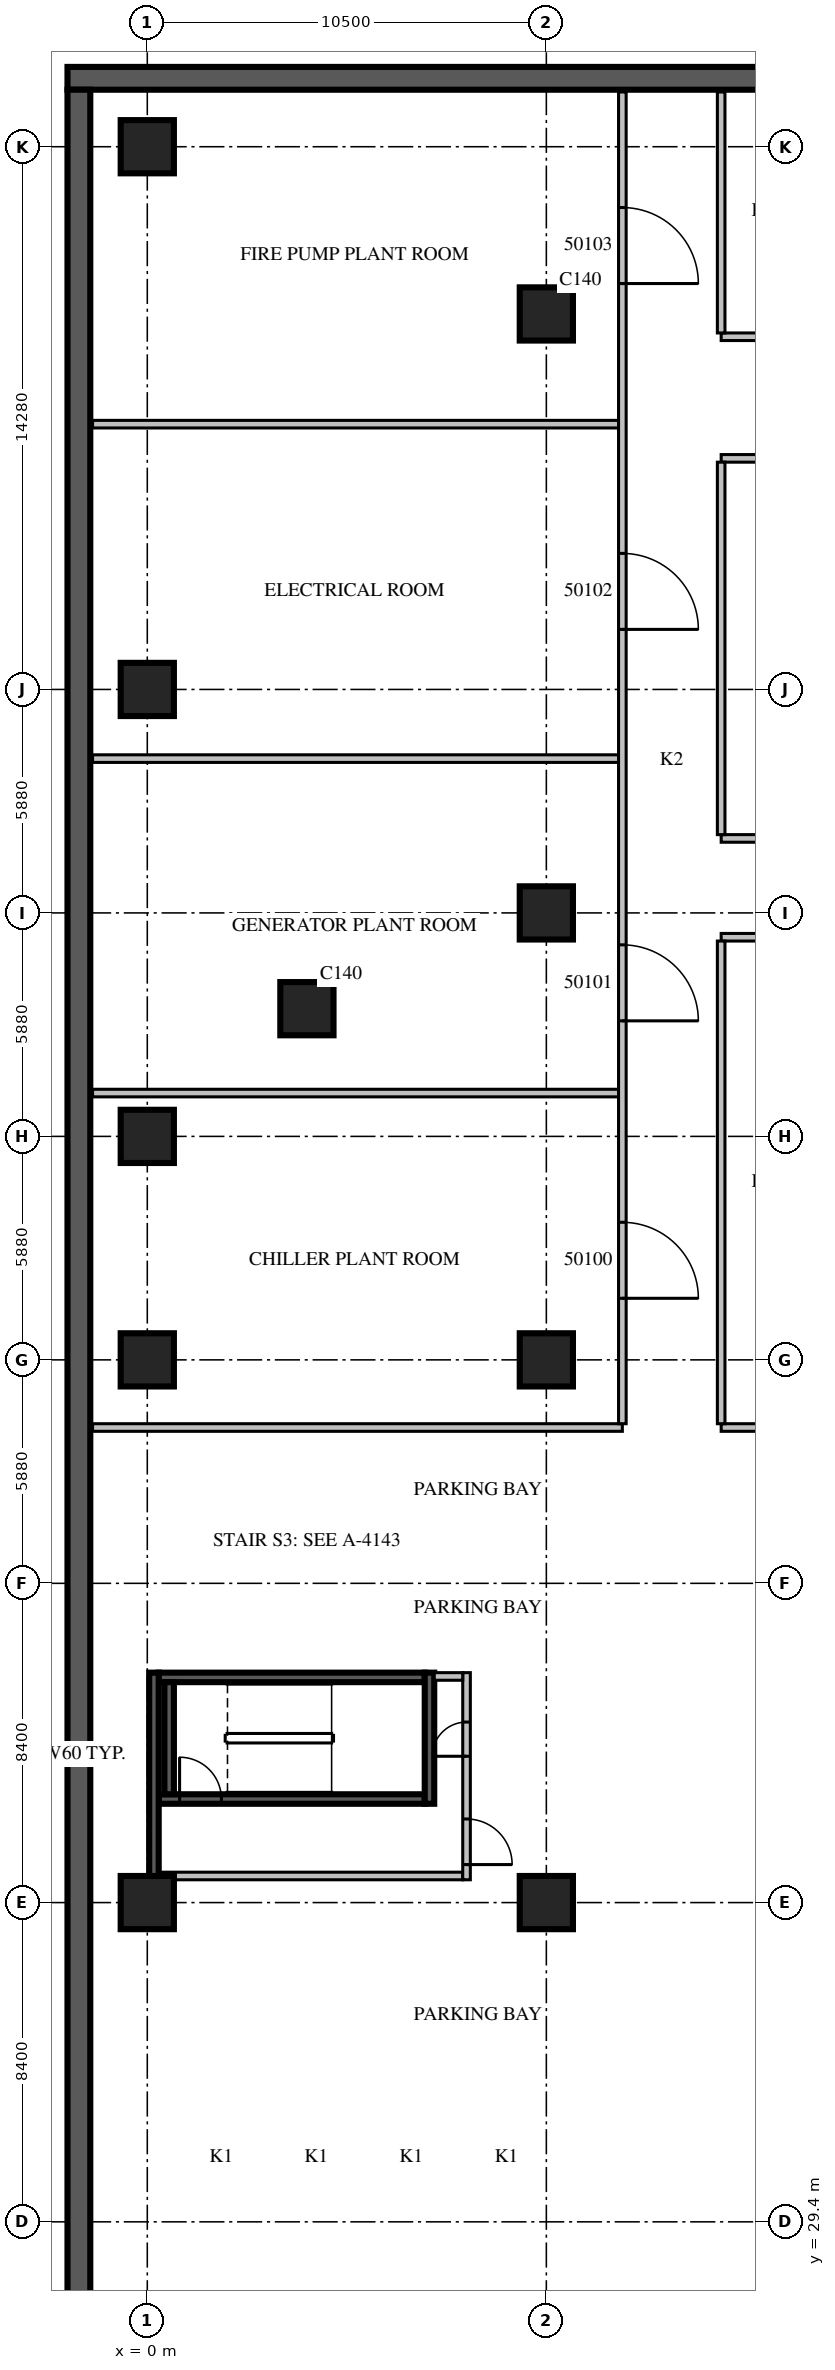
"""IFC4 building model, lengths in metres.
Left out: names, types, materials, properties, quantities, classifications, styles, units other than length and angle.
Written with IfcOpenShell. Run it as: python <this file> out.ifc"""

import sys

from ifc_helpers import new_model, si_unit, direction, frame, frame_2d, origin, origin_2d, place, context, subcontext, project, spatial, rectangle, extrude, source, transform, mapped, element, fill, save


model = new_model("IFC4")
c1 = context("Model", 3, precision=1e-05, world=origin(), true_north=direction((0.0, 1.0)))
c2 = subcontext(c1, "Body", "Model", "MODEL_VIEW")
j1 = project(units=[si_unit("LENGTHUNIT", "METRE"), si_unit("PLANEANGLEUNIT", "RADIAN")], contexts=[c1])
p1 = place(None, origin())
s1 = spatial("IfcSite", under=j1, at=p1, CompositionType="ELEMENT")
p2 = place(p1, origin())
s2 = spatial("IfcBuilding", under=s1, at=p2, CompositionType="ELEMENT")
p3 = place(p2, frame((0.0, 0.0, -9.0)))
s3 = spatial("IfcBuildingStorey", under=s2, at=p3, CompositionType="ELEMENT", Elevation=-9.0)
m1 = source(origin(), c2, "Body", "SweptSolid", [
    extrude(rectangle(XDim=55.68, YDim=0.6, at=frame_2d((27.84, 0.0))), origin(), (0.0, 0.0, 1.0), 4.5),
])
p4 = place(p3, frame((53.58, 85.8, 0.0), z_axis=(0.0, 0.0, 1.0), x_axis=(-1.0, 0.0, 0.0)))
e1 = element("IfcWall", 1, at=p4, inside=s3, PredefinedType="SOLIDWALL", context=c2, shape_type="MappedRepresentation", body=[
    mapped(m1, transform((0.0, 0.0, 0.0), scale=1.0)),
])
m2 = source(origin(), c2, "Body", "SweptSolid", [
    extrude(rectangle(XDim=87.6, YDim=0.6, at=frame_2d((43.8, 0.0))), origin(), (0.0, 0.0, 1.0), 4.5),
])
p5 = place(p3, frame((-1.8, 85.5, 0.0), z_axis=(0.0, 0.0, 1.0), x_axis=(0.0, -1.0, 0.0)))
e2 = element("IfcWall", 2, at=p5, inside=s3, PredefinedType="SOLIDWALL", context=c2, shape_type="MappedRepresentation", body=[
    mapped(m2, transform((0.0, 0.0, 0.0), scale=1.0)),
])
m3 = source(origin(), c2, "Body", "SweptSolid", [
    extrude(rectangle(XDim=1.4, YDim=1.4, at=origin_2d()), origin(), (0.0, 0.0, 1.0), 4.5),
])
for number, where, z_axis, x_axis in (
    (3, (0.0, 37.8, 0.0), (0.0, 0.0, 1.0), (1.0, 0.0, 0.0)),
    (4, (0.0, 52.08, 0.0), (0.0, 0.0, 1.0), (1.0, 0.0, 0.0)),
    (5, (0.0, 57.96, 0.0), (0.0, 0.0, 1.0), (1.0, 0.0, 0.0)),
    (6, (0.0, 69.72, 0.0), (0.0, 0.0, 1.0), (1.0, 0.0, 0.0)),
    (7, (0.0, 84.0, 0.0), (0.0, 0.0, 1.0), (1.0, 0.0, 0.0)),
    (8, (4.2, 61.32, 0.0), (0.0, 0.0, 1.0), (1.0, 0.0, 0.0)),
    (9, (10.5, 37.8, 0.0), (0.0, 0.0, 1.0), (1.0, 0.0, 0.0)),
    (10, (10.5, 52.08, 0.0), (0.0, 0.0, 1.0), (1.0, 0.0, 0.0)),
    (11, (10.5, 63.84, 0.0), (0.0, 0.0, 1.0), (1.0, 0.0, 0.0)),
    (12, (10.5, 79.6, 0.0), (0.0, 0.0, 1.0), (1.0, 0.0, 0.0)),
):
    element("IfcColumn", number, at=place(p3, frame(where, z_axis=z_axis, x_axis=x_axis)), inside=s3, PredefinedType="COLUMN", context=c2, shape_type="MappedRepresentation", body=[
        mapped(m3, transform((0.0, 0.0, 0.0), scale=1.0)),
    ])
m4 = source(origin(), c2, "Body", "SweptSolid", [
    extrude(rectangle(XDim=7.0, YDim=0.25, at=frame_2d((3.5, 0.0))), origin(), (0.0, 0.0, 1.0), 3.9),
])
p6 = place(p3, frame((0.3, 40.525, 0.0), z_axis=(0.0, 0.0, 1.0), x_axis=(1.0, 0.0, 0.0)))
e13 = element("IfcWall", 13, at=p6, inside=s3, PredefinedType="SOLIDWALL", context=c2, shape_type="MappedRepresentation", body=[
    mapped(m4, transform((0.0, 0.0, 0.0), scale=1.0)),
])
m5 = source(origin(), c2, "Body", "SweptSolid", [
    extrude(rectangle(XDim=1.1, YDim=2.1, at=frame_2d((0.55, 1.05))), frame((0.0, 0.135, 0.0), z_axis=(0.0, -1.0, 0.0), x_axis=(1.0, 0.0, 0.0)), (0.0, 0.0, 1.0), 0.27),
])
p7 = place(p6, frame((0.55, 0.0, 0.0)))
e14 = element("IfcOpeningElement", 14, at=p7, cuts=e13, PredefinedType="OPENING", context=c2, shape_type="MappedRepresentation", body=[
    mapped(m5, transform((0.0, 0.0, 0.0), scale=1.0)),
])
p8 = place(p3, frame((0.3, 43.725, 0.0), z_axis=(0.0, 0.0, 1.0), x_axis=(1.0, 0.0, 0.0)))
e15 = element("IfcWall", 15, at=p8, inside=s3, PredefinedType="SOLIDWALL", context=c2, shape_type="MappedRepresentation", body=[
    mapped(m4, transform((0.0, 0.0, 0.0), scale=1.0)),
])
m6 = source(origin(), c2, "Body", "SweptSolid", [
    extrude(rectangle(XDim=3.45, YDim=0.25, at=frame_2d((1.725, 0.0))), origin(), (0.0, 0.0, 1.0), 3.9),
])
p9 = place(p3, frame((7.425, 40.4, 0.0), z_axis=(0.0, 0.0, 1.0), x_axis=(0.0, 1.0, 0.0)))
e16 = element("IfcWall", 16, at=p9, inside=s3, PredefinedType="SOLIDWALL", context=c2, shape_type="MappedRepresentation", body=[
    mapped(m6, transform((0.0, 0.0, 0.0), scale=1.0)),
])
m7 = source(origin(), c2, "Body", "SweptSolid", [
    extrude(rectangle(XDim=2.95, YDim=0.25, at=frame_2d((1.475, 0.0))), origin(), (0.0, 0.0, 1.0), 3.9),
])
p10 = place(p3, frame((0.575, 40.65, 0.0), z_axis=(0.0, 0.0, 1.0), x_axis=(0.0, 1.0, 0.0)))
e17 = element("IfcWall", 17, at=p10, inside=s3, PredefinedType="SOLIDWALL", context=c2, shape_type="MappedRepresentation", body=[
    mapped(m7, transform((0.0, 0.0, 0.0), scale=1.0)),
])
m8 = source(origin(), c2, "Body", "SweptSolid", [
    extrude(rectangle(XDim=8.0, YDim=0.2, at=frame_2d((4.0, 0.0))), origin(), (0.0, 0.0, 1.0), 3.9),
])
p11 = place(p3, frame((0.3, 38.5, 0.0), z_axis=(0.0, 0.0, 1.0), x_axis=(1.0, 0.0, 0.0)))
e18 = element("IfcWall", 18, at=p11, inside=s3, PredefinedType="PARTITIONING", context=c2, shape_type="MappedRepresentation", body=[
    mapped(m8, transform((0.0, 0.0, 0.0), scale=1.0)),
])
m9 = source(origin(), c2, "Body", "SweptSolid", [
    extrude(rectangle(XDim=5.45, YDim=0.2, at=frame_2d((2.725, 0.0))), origin(), (0.0, 0.0, 1.0), 3.9),
])
p12 = place(p3, frame((8.4, 38.4, 0.0), z_axis=(0.0, 0.0, 1.0), x_axis=(0.0, 1.0, 0.0)))
e19 = element("IfcWall", 19, at=p12, inside=s3, PredefinedType="PARTITIONING", context=c2, shape_type="MappedRepresentation", body=[
    mapped(m9, transform((0.0, 0.0, 0.0), scale=1.0)),
])
m10 = source(origin(), c2, "Body", "SweptSolid", [
    extrude(rectangle(XDim=1.2, YDim=2.1, at=frame_2d((0.6, 1.05))), frame((0.0, 0.11, 0.0), z_axis=(0.0, -1.0, 0.0), x_axis=(1.0, 0.0, 0.0)), (0.0, 0.0, 1.0), 0.22),
])
p13 = place(p12, frame((0.4, 0.0, 0.0)))
e20 = element("IfcOpeningElement", 20, at=p13, cuts=e19, PredefinedType="OPENING", context=c2, shape_type="MappedRepresentation", body=[
    mapped(m10, transform((0.0, 0.0, 0.0), scale=1.0)),
])
m11 = source(origin(), c2, "Body", "SweptSolid", [
    extrude(rectangle(XDim=0.9, YDim=2.1, at=frame_2d((0.45, 1.05))), frame((0.0, 0.11, 0.0), z_axis=(0.0, -1.0, 0.0), x_axis=(1.0, 0.0, 0.0)), (0.0, 0.0, 1.0), 0.22),
])
p14 = place(p12, frame((3.25, 0.0, 0.0)))
e21 = element("IfcOpeningElement", 21, at=p14, cuts=e19, PredefinedType="OPENING", context=c2, shape_type="MappedRepresentation", body=[
    mapped(m11, transform((0.0, 0.0, 0.0), scale=1.0)),
])
m12 = source(origin(), c2, "Body", "SweptSolid", [
    extrude(rectangle(XDim=0.75, YDim=0.2, at=frame_2d((0.375, 0.0))), origin(), (0.0, 0.0, 1.0), 3.9),
])
p15 = place(p3, frame((7.55, 43.75, 0.0), z_axis=(0.0, 0.0, 1.0), x_axis=(1.0, 0.0, 0.0)))
e22 = element("IfcWall", 22, at=p15, inside=s3, PredefinedType="PARTITIONING", context=c2, shape_type="MappedRepresentation", body=[
    mapped(m12, transform((0.0, 0.0, 0.0), scale=1.0)),
])
m13 = source(origin(), c2, "Body", "SweptSolid", [
    extrude(rectangle(XDim=5.45, YDim=0.25, at=frame_2d((2.725, 0.0))), origin(), (0.0, 0.0, 1.0), 3.9),
])
p16 = place(p3, frame((0.175, 38.4, 0.0), z_axis=(0.0, 0.0, 1.0), x_axis=(0.0, 1.0, 0.0)))
e23 = element("IfcWall", 23, at=p16, inside=s3, PredefinedType="SOLIDWALL", context=c2, shape_type="MappedRepresentation", body=[
    mapped(m13, transform((0.0, 0.0, 0.0), scale=1.0)),
])
m14 = source(origin(), c2, "Body", "SweptSolid", [
    extrude(rectangle(XDim=13.94, YDim=0.2, at=frame_2d((6.97, 0.0))), origin(), (0.0, 0.0, 1.0), 3.9),
])
p17 = place(p3, frame((-1.44, 50.3, 0.0), z_axis=(0.0, 0.0, 1.0), x_axis=(1.0, 0.0, 0.0)))
e24 = element("IfcWall", 24, at=p17, inside=s3, PredefinedType="PARTITIONING", context=c2, shape_type="MappedRepresentation", body=[
    mapped(m14, transform((0.0, 0.0, 0.0), scale=1.0)),
])
m15 = source(origin(), c2, "Body", "SweptSolid", [
    extrude(rectangle(XDim=38.48, YDim=0.2, at=frame_2d((19.24, 0.0))), origin(), (0.0, 0.0, 1.0), 3.9),
])
p18 = place(p3, frame((15.1, 50.3, 0.0), z_axis=(0.0, 0.0, 1.0), x_axis=(1.0, 0.0, 0.0)))
e25 = element("IfcWall", 25, at=p18, inside=s3, PredefinedType="PARTITIONING", context=c2, shape_type="MappedRepresentation", body=[
    mapped(m15, transform((0.0, 0.0, 0.0), scale=1.0)),
])
p19 = place(p3, frame((-1.44, 59.1, 0.0), z_axis=(0.0, 0.0, 1.0), x_axis=(1.0, 0.0, 0.0)))
e26 = element("IfcWall", 26, at=p19, inside=s3, PredefinedType="PARTITIONING", context=c2, shape_type="MappedRepresentation", body=[
    mapped(m14, transform((0.0, 0.0, 0.0), scale=1.0)),
])
m16 = source(origin(), c2, "Body", "SweptSolid", [
    extrude(rectangle(XDim=38.42, YDim=0.2, at=frame_2d((19.21, 0.0))), origin(), (0.0, 0.0, 1.0), 3.9),
])
p20 = place(p3, frame((15.1, 63.2, 0.0), z_axis=(0.0, 0.0, 1.0), x_axis=(1.0, 0.0, 0.0)))
e27 = element("IfcWall", 27, at=p20, inside=s3, PredefinedType="PARTITIONING", context=c2, shape_type="MappedRepresentation", body=[
    mapped(m16, transform((0.0, 0.0, 0.0), scale=1.0)),
])
p21 = place(p20, frame((3.2, 0.0, 0.0)))
e28 = element("IfcOpeningElement", 28, at=p21, cuts=e27, PredefinedType="OPENING", context=c2, shape_type="MappedRepresentation", body=[
    mapped(m10, transform((0.0, 0.0, 0.0), scale=1.0)),
])
m17 = source(origin(), c2, "Body", "SweptSolid", [
    extrude(rectangle(XDim=2.0, YDim=2.1, at=frame_2d((1.0, 1.05))), frame((0.0, 0.11, 0.0), z_axis=(0.0, -1.0, 0.0), x_axis=(1.0, 0.0, 0.0)), (0.0, 0.0, 1.0), 0.22),
])
p22 = place(p20, frame((10.5, 0.0, 0.0)))
e29 = element("IfcOpeningElement", 29, at=p22, cuts=e27, PredefinedType="OPENING", context=c2, shape_type="MappedRepresentation", body=[
    mapped(m17, transform((0.0, 0.0, 0.0), scale=1.0)),
])
p23 = place(p20, frame((18.6, 0.0, 0.0)))
e30 = element("IfcOpeningElement", 30, at=p23, cuts=e27, PredefinedType="OPENING", context=c2, shape_type="MappedRepresentation", body=[
    mapped(m17, transform((0.0, 0.0, 0.0), scale=1.0)),
])
p24 = place(p20, frame((26.7, 0.0, 0.0)))
e31 = element("IfcOpeningElement", 31, at=p24, cuts=e27, PredefinedType="OPENING", context=c2, shape_type="MappedRepresentation", body=[
    mapped(m17, transform((0.0, 0.0, 0.0), scale=1.0)),
])
p25 = place(p20, frame((34.4, 0.0, 0.0)))
e32 = element("IfcOpeningElement", 32, at=p25, cuts=e27, PredefinedType="OPENING", context=c2, shape_type="MappedRepresentation", body=[
    mapped(m10, transform((0.0, 0.0, 0.0), scale=1.0)),
])
p26 = place(p3, frame((15.1, 65.8, 0.0), z_axis=(0.0, 0.0, 1.0), x_axis=(1.0, 0.0, 0.0)))
e33 = element("IfcWall", 33, at=p26, inside=s3, PredefinedType="PARTITIONING", context=c2, shape_type="MappedRepresentation", body=[
    mapped(m16, transform((0.0, 0.0, 0.0), scale=1.0)),
])
p27 = place(p26, frame((3.2, 0.0, 0.0)))
e34 = element("IfcOpeningElement", 34, at=p27, cuts=e33, PredefinedType="OPENING", context=c2, shape_type="MappedRepresentation", body=[
    mapped(m10, transform((0.0, 0.0, 0.0), scale=1.0)),
])
p28 = place(p26, frame((10.9, 0.0, 0.0)))
e35 = element("IfcOpeningElement", 35, at=p28, cuts=e33, PredefinedType="OPENING", context=c2, shape_type="MappedRepresentation", body=[
    mapped(m10, transform((0.0, 0.0, 0.0), scale=1.0)),
])
p29 = place(p26, frame((19.0, 0.0, 0.0)))
e36 = element("IfcOpeningElement", 36, at=p29, cuts=e33, PredefinedType="OPENING", context=c2, shape_type="MappedRepresentation", body=[
    mapped(m10, transform((0.0, 0.0, 0.0), scale=1.0)),
])
p30 = place(p26, frame((26.7, 0.0, 0.0)))
e37 = element("IfcOpeningElement", 37, at=p30, cuts=e33, PredefinedType="OPENING", context=c2, shape_type="MappedRepresentation", body=[
    mapped(m10, transform((0.0, 0.0, 0.0), scale=1.0)),
])
p31 = place(p26, frame((34.0, 0.0, 0.0)))
e38 = element("IfcOpeningElement", 38, at=p31, cuts=e33, PredefinedType="OPENING", context=c2, shape_type="MappedRepresentation", body=[
    mapped(m10, transform((0.0, 0.0, 0.0), scale=1.0)),
])
p32 = place(p3, frame((-1.44, 67.9, 0.0), z_axis=(0.0, 0.0, 1.0), x_axis=(1.0, 0.0, 0.0)))
e39 = element("IfcWall", 39, at=p32, inside=s3, PredefinedType="PARTITIONING", context=c2, shape_type="MappedRepresentation", body=[
    mapped(m14, transform((0.0, 0.0, 0.0), scale=1.0)),
])
p33 = place(p3, frame((15.1, 75.8, 0.0), z_axis=(0.0, 0.0, 1.0), x_axis=(1.0, 0.0, 0.0)))
e40 = element("IfcWall", 40, at=p33, inside=s3, PredefinedType="PARTITIONING", context=c2, shape_type="MappedRepresentation", body=[
    mapped(m16, transform((0.0, 0.0, 0.0), scale=1.0)),
])
p34 = place(p3, frame((-1.44, 76.7, 0.0), z_axis=(0.0, 0.0, 1.0), x_axis=(1.0, 0.0, 0.0)))
e41 = element("IfcWall", 41, at=p34, inside=s3, PredefinedType="PARTITIONING", context=c2, shape_type="MappedRepresentation", body=[
    mapped(m14, transform((0.0, 0.0, 0.0), scale=1.0)),
])
p35 = place(p3, frame((15.1, 79.0, 0.0), z_axis=(0.0, 0.0, 1.0), x_axis=(1.0, 0.0, 0.0)))
e42 = element("IfcWall", 42, at=p35, inside=s3, PredefinedType="PARTITIONING", context=c2, shape_type="MappedRepresentation", body=[
    mapped(m16, transform((0.0, 0.0, 0.0), scale=1.0)),
])
p36 = place(p35, frame((3.2, 0.0, 0.0)))
e43 = element("IfcOpeningElement", 43, at=p36, cuts=e42, PredefinedType="OPENING", context=c2, shape_type="MappedRepresentation", body=[
    mapped(m10, transform((0.0, 0.0, 0.0), scale=1.0)),
])
p37 = place(p35, frame((11.2, 0.0, 0.0)))
e44 = element("IfcOpeningElement", 44, at=p37, cuts=e42, PredefinedType="OPENING", context=c2, shape_type="MappedRepresentation", body=[
    mapped(m10, transform((0.0, 0.0, 0.0), scale=1.0)),
])
p38 = place(p35, frame((19.3, 0.0, 0.0)))
e45 = element("IfcOpeningElement", 45, at=p38, cuts=e42, PredefinedType="OPENING", context=c2, shape_type="MappedRepresentation", body=[
    mapped(m10, transform((0.0, 0.0, 0.0), scale=1.0)),
])
p39 = place(p35, frame((26.7, 0.0, 0.0)))
e46 = element("IfcOpeningElement", 46, at=p39, cuts=e42, PredefinedType="OPENING", context=c2, shape_type="MappedRepresentation", body=[
    mapped(m10, transform((0.0, 0.0, 0.0), scale=1.0)),
])
p40 = place(p35, frame((34.0, 0.0, 0.0)))
e47 = element("IfcOpeningElement", 47, at=p40, cuts=e42, PredefinedType="OPENING", context=c2, shape_type="MappedRepresentation", body=[
    mapped(m10, transform((0.0, 0.0, 0.0), scale=1.0)),
])
m18 = source(origin(), c2, "Body", "SweptSolid", [
    extrude(rectangle(XDim=35.04, YDim=0.2, at=frame_2d((17.52, 0.0))), origin(), (0.0, 0.0, 1.0), 3.9),
])
p41 = place(p3, frame((12.5, 50.4, 0.0), z_axis=(0.0, 0.0, 1.0), x_axis=(0.0, 1.0, 0.0)))
e48 = element("IfcWall", 48, at=p41, inside=s3, PredefinedType="PARTITIONING", context=c2, shape_type="MappedRepresentation", body=[
    mapped(m18, transform((0.0, 0.0, 0.0), scale=1.0)),
])
p42 = place(p41, frame((3.3, 0.0, 0.0)))
e49 = element("IfcOpeningElement", 49, at=p42, cuts=e48, PredefinedType="OPENING", context=c2, shape_type="MappedRepresentation", body=[
    mapped(m17, transform((0.0, 0.0, 0.0), scale=1.0)),
])
p43 = place(p41, frame((10.6, 0.0, 0.0)))
e50 = element("IfcOpeningElement", 50, at=p43, cuts=e48, PredefinedType="OPENING", context=c2, shape_type="MappedRepresentation", body=[
    mapped(m17, transform((0.0, 0.0, 0.0), scale=1.0)),
])
p44 = place(p41, frame((20.9, 0.0, 0.0)))
e51 = element("IfcOpeningElement", 51, at=p44, cuts=e48, PredefinedType="OPENING", context=c2, shape_type="MappedRepresentation", body=[
    mapped(m17, transform((0.0, 0.0, 0.0), scale=1.0)),
])
p45 = place(p41, frame((30.0, 0.0, 0.0)))
e52 = element("IfcOpeningElement", 52, at=p45, cuts=e48, PredefinedType="OPENING", context=c2, shape_type="MappedRepresentation", body=[
    mapped(m17, transform((0.0, 0.0, 0.0), scale=1.0)),
])
m19 = source(origin(), c2, "Body", "SweptSolid", [
    extrude(rectangle(XDim=12.7, YDim=0.2, at=frame_2d((6.35, 0.0))), origin(), (0.0, 0.0, 1.0), 3.9),
])
p46 = place(p3, frame((15.1, 50.4, 0.0), z_axis=(0.0, 0.0, 1.0), x_axis=(0.0, 1.0, 0.0)))
e53 = element("IfcWall", 53, at=p46, inside=s3, PredefinedType="PARTITIONING", context=c2, shape_type="MappedRepresentation", body=[
    mapped(m19, transform((0.0, 0.0, 0.0), scale=1.0)),
])
m20 = source(origin(), c2, "Body", "SweptSolid", [
    extrude(rectangle(XDim=9.8, YDim=0.2, at=frame_2d((4.9, 0.0))), origin(), (0.0, 0.0, 1.0), 3.9),
])
p47 = place(p3, frame((15.1, 65.9, 0.0), z_axis=(0.0, 0.0, 1.0), x_axis=(0.0, 1.0, 0.0)))
e54 = element("IfcWall", 54, at=p47, inside=s3, PredefinedType="PARTITIONING", context=c2, shape_type="MappedRepresentation", body=[
    mapped(m20, transform((0.0, 0.0, 0.0), scale=1.0)),
])
m21 = source(origin(), c2, "Body", "SweptSolid", [
    extrude(rectangle(XDim=6.34, YDim=0.2, at=frame_2d((3.17, 0.0))), origin(), (0.0, 0.0, 1.0), 3.9),
])
p48 = place(p3, frame((15.1, 79.1, 0.0), z_axis=(0.0, 0.0, 1.0), x_axis=(0.0, 1.0, 0.0)))
e55 = element("IfcWall", 55, at=p48, inside=s3, PredefinedType="PARTITIONING", context=c2, shape_type="MappedRepresentation", body=[
    mapped(m21, transform((0.0, 0.0, 0.0), scale=1.0)),
])
m22 = source(origin(), c2, "Body", "SweptSolid", [
    extrude(rectangle(XDim=1.1, YDim=2.1, at=frame_2d((0.55, 1.05))), frame((0.0, 0.025, 0.0), z_axis=(0.0, -1.0, 0.0), x_axis=(1.0, 0.0, 0.0)), (0.0, 0.0, 1.0), 0.05),
])
p49 = place(p7, origin())
e56 = element("IfcDoor", 56, at=p49, inside=s3, OperationType="SINGLE_SWING_LEFT", PredefinedType="DOOR", context=c2, shape_type="MappedRepresentation", body=[
    mapped(m22, transform((0.0, 0.0, 0.0), scale=1.0)),
])
fill(e14, e56)
m23 = source(origin(), c2, "Body", "SweptSolid", [
    extrude(rectangle(XDim=1.2, YDim=2.1, at=frame_2d((0.6, 1.05))), frame((0.0, 0.025, 0.0), z_axis=(0.0, -1.0, 0.0), x_axis=(1.0, 0.0, 0.0)), (0.0, 0.0, 1.0), 0.05),
])
p50 = place(p13, origin())
e57 = element("IfcDoor", 57, at=p50, inside=s3, OperationType="SINGLE_SWING_RIGHT", PredefinedType="DOOR", context=c2, shape_type="MappedRepresentation", body=[
    mapped(m23, transform((0.0, 0.0, 0.0), scale=1.0)),
])
fill(e20, e57)
m24 = source(origin(), c2, "Body", "SweptSolid", [
    extrude(rectangle(XDim=0.9, YDim=2.1, at=frame_2d((0.45, 1.05))), frame((0.0, 0.025, 0.0), z_axis=(0.0, -1.0, 0.0), x_axis=(1.0, 0.0, 0.0)), (0.0, 0.0, 1.0), 0.05),
])
p51 = place(p14, origin())
e58 = element("IfcDoor", 58, at=p51, inside=s3, OperationType="SINGLE_SWING_LEFT", PredefinedType="DOOR", context=c2, shape_type="MappedRepresentation", body=[
    mapped(m24, transform((0.0, 0.0, 0.0), scale=1.0)),
])
fill(e21, e58)
m25 = source(origin(), c2, "Body", "SweptSolid", [
    extrude(rectangle(XDim=2.0, YDim=2.1, at=frame_2d((1.0, 1.05))), frame((0.0, 0.025, 0.0), z_axis=(0.0, -1.0, 0.0), x_axis=(1.0, 0.0, 0.0)), (0.0, 0.0, 1.0), 0.05),
])
p52 = place(p42, origin())
e59 = element("IfcDoor", 59, at=p52, inside=s3, OperationType="DOUBLE_DOOR_SINGLE_SWING", PredefinedType="DOOR", context=c2, shape_type="MappedRepresentation", body=[
    mapped(m25, transform((0.0, 0.0, 0.0), scale=1.0)),
])
fill(e49, e59)
p53 = place(p43, origin())
e60 = element("IfcDoor", 60, at=p53, inside=s3, OperationType="DOUBLE_DOOR_SINGLE_SWING", PredefinedType="DOOR", context=c2, shape_type="MappedRepresentation", body=[
    mapped(m25, transform((0.0, 0.0, 0.0), scale=1.0)),
])
fill(e50, e60)
p54 = place(p44, origin())
e61 = element("IfcDoor", 61, at=p54, inside=s3, OperationType="DOUBLE_DOOR_SINGLE_SWING", PredefinedType="DOOR", context=c2, shape_type="MappedRepresentation", body=[
    mapped(m25, transform((0.0, 0.0, 0.0), scale=1.0)),
])
fill(e51, e61)
p55 = place(p45, origin())
e62 = element("IfcDoor", 62, at=p55, inside=s3, OperationType="DOUBLE_DOOR_SINGLE_SWING", PredefinedType="DOOR", context=c2, shape_type="MappedRepresentation", body=[
    mapped(m25, transform((0.0, 0.0, 0.0), scale=1.0)),
])
fill(e52, e62)
save(model, sys.argv[1])
